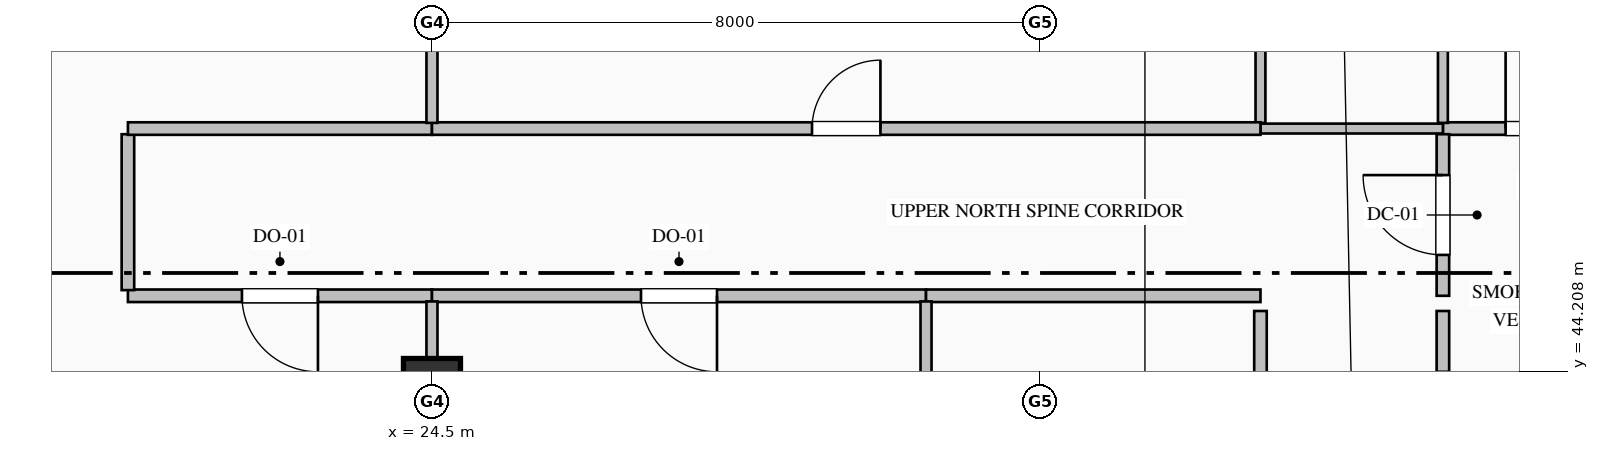
"""IFC4 building model, lengths in metres.
Left out: names, types, materials, properties, quantities, classifications, styles, units other than length and angle.
Written with IfcOpenShell. Run it as: python <this file> out.ifc"""

import sys

from ifc_helpers import new_model, si_unit, direction, frame, frame_2d, origin, origin_2d, place, context, subcontext, project, spatial, rectangle, extrude, element, fill, save


model = new_model("IFC4")
c1 = context("Model", 3, precision=1e-05, world=origin(), true_north=direction((0.0, 1.0)))
c2 = subcontext(c1, "Body", "Model", "MODEL_VIEW")
j1 = project(units=[si_unit("LENGTHUNIT", "METRE"), si_unit("PLANEANGLEUNIT", "RADIAN")], contexts=[c1])
p1 = place(None, origin())
s1 = spatial("IfcSite", under=j1, at=p1, CompositionType="ELEMENT")
p2 = place(p1, origin())
s2 = spatial("IfcBuilding", under=s1, at=p2, CompositionType="ELEMENT")
p3 = place(p2, frame((0.0, 0.0, 323.2)))
s3 = spatial("IfcBuildingStorey", under=s2, at=p3, CompositionType="ELEMENT", Elevation=323.2)
p4 = place(p3, frame((24.5, 44.0, 0.0), z_axis=(0.0, 0.0, 1.0), x_axis=(1.0, 0.0, 0.0)))
e1 = element("IfcColumn", 1, at=p4, inside=s3, PredefinedType="COLUMN", context=c2, shape_type="SweptSolid", body=[
    extrude(rectangle(XDim=0.75, YDim=0.75, at=origin_2d()), origin(), (0.0, 0.0, 1.0), 4.0),
])
p5 = place(p3, frame((16.627, 47.873, 0.0), z_axis=(0.0, 0.0, 1.0), x_axis=(0.707106781187, 0.707106781187, 0.0)))
e2 = element("IfcWall", 2, at=p5, inside=s3, PredefinedType="SOLIDWALL", context=c2, shape_type="SweptSolid", body=[
    extrude(rectangle(XDim=5.657, YDim=0.36, at=frame_2d((2.828, 0.0))), origin(), (0.0, 0.0, 1.0), 3.785),
])
p6 = place(p3, frame((37.8, 47.4, 0.0), z_axis=(0.0, 0.0, 1.0), x_axis=(1.0, 0.0, 0.0)))
e3 = element("IfcWall", 3, at=p6, inside=s3, PredefinedType="PARTITIONING", context=c2, shape_type="SweptSolid", body=[
    extrude(rectangle(XDim=2.7, YDim=0.165, at=frame_2d((1.35, 0.0))), origin(), (0.0, 0.0, 1.0), 3.785),
])
p7 = place(p6, frame((0.825, 0.0, 0.0)))
e4 = element("IfcOpeningElement", 4, at=p7, cuts=e3, PredefinedType="OPENING", context=c2, shape_type="SweptSolid", body=[
    extrude(rectangle(XDim=1.05, YDim=2.15, at=frame_2d((0.525, 1.075))), frame((0.0, 0.093, 0.0), z_axis=(0.0, -1.0, 0.0), x_axis=(1.0, 0.0, 0.0)), (0.0, 0.0, 1.0), 0.185),
])
p8 = place(p3, frame((37.8, 45.2, 0.0), z_axis=(0.0, 0.0, 1.0), x_axis=(0.0, 1.0, 0.0)))
e5 = element("IfcWall", 5, at=p8, inside=s3, PredefinedType="PARTITIONING", context=c2, shape_type="SweptSolid", body=[
    extrude(rectangle(XDim=2.125, YDim=0.165, at=frame_2d((1.063, 0.0))), origin(), (0.0, 0.0, 1.0), 3.785),
])
p9 = place(p8, frame((0.538, 0.0, 0.0)))
e6 = element("IfcOpeningElement", 6, at=p9, cuts=e5, PredefinedType="OPENING", context=c2, shape_type="SweptSolid", body=[
    extrude(rectangle(XDim=1.05, YDim=2.15, at=frame_2d((0.525, 1.075))), frame((0.0, 0.093, 0.0), z_axis=(0.0, -1.0, 0.0), x_axis=(1.0, 0.0, 0.0)), (0.0, 0.0, 1.0), 0.185),
])
p10 = place(p3, frame((37.8, 44.2, 0.0), z_axis=(0.0, 0.0, 1.0), x_axis=(0.0, 1.0, 0.0)))
e7 = element("IfcWall", 7, at=p10, inside=s3, PredefinedType="PARTITIONING", context=c2, shape_type="SweptSolid", body=[
    extrude(rectangle(XDim=0.8, YDim=0.165, at=frame_2d((0.4, 0.0))), origin(), (0.0, 0.0, 1.0), 3.785),
])
p11 = place(p3, frame((37.8, 47.475, 0.0), z_axis=(0.0, 0.0, 1.0), x_axis=(0.0, 1.0, 0.0)))
e8 = element("IfcWall", 8, at=p11, inside=s3, PredefinedType="PARTITIONING", context=c2, shape_type="SweptSolid", body=[
    extrude(rectangle(XDim=4.173, YDim=0.13, at=frame_2d((2.087, 0.0))), origin(), (0.0, 0.0, 1.0), 3.785),
])
p12 = place(p11, frame((1.577, 0.0, 0.0)))
e9 = element("IfcOpeningElement", 9, at=p12, cuts=e8, PredefinedType="OPENING", context=c2, shape_type="SweptSolid", body=[
    extrude(rectangle(XDim=1.02, YDim=2.15, at=frame_2d((0.51, 1.075))), frame((0.0, 0.075, 0.0), z_axis=(0.0, -1.0, 0.0), x_axis=(1.0, 0.0, 0.0)), (0.0, 0.0, 1.0), 0.15),
])
p13 = place(p3, frame((37.8, 47.4, 0.0), z_axis=(0.0, 0.0, 1.0), x_axis=(-1.0, 0.0, 0.0)))
e10 = element("IfcWall", 10, at=p13, inside=s3, PredefinedType="PARTITIONING", context=c2, shape_type="SweptSolid", body=[
    extrude(rectangle(XDim=2.4, YDim=0.13, at=frame_2d((1.2, 0.0))), origin(), (0.0, 0.0, 1.0), 3.785),
])
p14 = place(p3, frame((35.4, 47.475, 0.0), z_axis=(0.0, 0.0, 1.0), x_axis=(0.0, 1.0, 0.0)))
e11 = element("IfcWall", 11, at=p14, inside=s3, PredefinedType="PARTITIONING", context=c2, shape_type="SweptSolid", body=[
    extrude(rectangle(XDim=4.173, YDim=0.13, at=frame_2d((2.087, 0.0))), origin(), (0.0, 0.0, 1.0), 3.785),
])
p15 = place(p3, frame((24.5, 45.2, 0.0), z_axis=(0.0, 0.0, 1.0), x_axis=(-1.0, 0.0, 0.0)))
e12 = element("IfcWall", 12, at=p15, inside=s3, PredefinedType="PARTITIONING", context=c2, shape_type="SweptSolid", body=[
    extrude(rectangle(XDim=4.0, YDim=0.165, at=frame_2d((2.0, 0.0))), origin(), (0.0, 0.0, 1.0), 3.785),
])
p16 = place(p15, frame((1.5, 0.0, 0.0)))
e13 = element("IfcOpeningElement", 13, at=p16, cuts=e12, PredefinedType="OPENING", context=c2, shape_type="SweptSolid", body=[
    extrude(rectangle(XDim=1.0, YDim=2.15, at=frame_2d((0.5, 1.075))), frame((0.0, 0.093, 0.0), z_axis=(0.0, -1.0, 0.0), x_axis=(1.0, 0.0, 0.0)), (0.0, 0.0, 1.0), 0.185),
])
p17 = place(p3, frame((20.5, 45.274, 0.0), z_axis=(0.0, 0.0, 1.0), x_axis=(0.0, 1.0, 0.0)))
e14 = element("IfcWall", 14, at=p17, inside=s3, PredefinedType="PARTITIONING", context=c2, shape_type="SweptSolid", body=[
    extrude(rectangle(XDim=2.051, YDim=0.165, at=frame_2d((1.025, 0.0))), origin(), (0.0, 0.0, 1.0), 3.785),
])
p18 = place(p3, frame((20.5, 47.4, 0.0), z_axis=(0.0, 0.0, 1.0), x_axis=(1.0, 0.0, 0.0)))
e15 = element("IfcWall", 15, at=p18, inside=s3, PredefinedType="PARTITIONING", context=c2, shape_type="SweptSolid", body=[
    extrude(rectangle(XDim=4.0, YDim=0.165, at=frame_2d((2.0, 0.0))), origin(), (0.0, 0.0, 1.0), 3.785),
])
p19 = place(p3, frame((24.5, 47.4, 0.0), z_axis=(0.0, 0.0, 1.0), x_axis=(1.0, 0.0, 0.0)))
e16 = element("IfcWall", 16, at=p19, inside=s3, PredefinedType="PARTITIONING", context=c2, shape_type="SweptSolid", body=[
    extrude(rectangle(XDim=10.9, YDim=0.165, at=frame_2d((5.45, 0.0))), origin(), (0.0, 0.0, 1.0), 3.785),
])
p20 = place(p19, frame((5.0, 0.0, 0.0)))
e17 = element("IfcOpeningElement", 17, at=p20, cuts=e16, PredefinedType="OPENING", context=c2, shape_type="SweptSolid", body=[
    extrude(rectangle(XDim=0.9, YDim=2.15, at=frame_2d((0.45, 1.075))), frame((0.0, 0.093, 0.0), z_axis=(0.0, -1.0, 0.0), x_axis=(1.0, 0.0, 0.0)), (0.0, 0.0, 1.0), 0.185),
])
p21 = place(p3, frame((31.0, 45.2, 0.0), z_axis=(0.0, 0.0, 1.0), x_axis=(-1.0, 0.0, 0.0)))
e18 = element("IfcWall", 18, at=p21, inside=s3, PredefinedType="PARTITIONING", context=c2, shape_type="SweptSolid", body=[
    extrude(rectangle(XDim=6.5, YDim=0.165, at=frame_2d((3.25, 0.0))), origin(), (0.0, 0.0, 1.0), 3.785),
])
p22 = place(p21, frame((2.75, 0.0, 0.0)))
e19 = element("IfcOpeningElement", 19, at=p22, cuts=e18, PredefinedType="OPENING", context=c2, shape_type="SweptSolid", body=[
    extrude(rectangle(XDim=1.0, YDim=2.15, at=frame_2d((0.5, 1.075))), frame((0.0, 0.093, 0.0), z_axis=(0.0, -1.0, 0.0), x_axis=(1.0, 0.0, 0.0)), (0.0, 0.0, 1.0), 0.185),
])
p23 = place(p3, frame((35.4, 45.2, 0.0), z_axis=(0.0, 0.0, 1.0), x_axis=(-1.0, 0.0, 0.0)))
e20 = element("IfcWall", 20, at=p23, inside=s3, PredefinedType="PARTITIONING", context=c2, shape_type="SweptSolid", body=[
    extrude(rectangle(XDim=4.4, YDim=0.165, at=frame_2d((2.2, 0.0))), origin(), (0.0, 0.0, 1.0), 3.785),
])
p24 = place(p3, frame((35.4, 33.6, 0.0), z_axis=(0.0, 0.0, 1.0), x_axis=(0.0, 1.0, 0.0)))
e21 = element("IfcWall", 21, at=p24, inside=s3, PredefinedType="PARTITIONING", context=c2, shape_type="SweptSolid", body=[
    extrude(rectangle(XDim=11.4, YDim=0.165, at=frame_2d((5.7, 0.0))), origin(), (0.0, 0.0, 1.0), 3.785),
])
p25 = place(p24, frame((5.2, 0.0, 0.0)))
e22 = element("IfcOpeningElement", 22, at=p25, cuts=e21, PredefinedType="OPENING", context=c2, shape_type="SweptSolid", body=[
    extrude(rectangle(XDim=1.0, YDim=2.15, at=frame_2d((0.5, 1.075))), frame((0.0, 0.093, 0.0), z_axis=(0.0, -1.0, 0.0), x_axis=(1.0, 0.0, 0.0)), (0.0, 0.0, 1.0), 0.185),
])
p26 = place(p3, frame((24.5, 51.648, 0.0), z_axis=(0.0, 0.0, 1.0), x_axis=(0.0, -1.0, 0.0)))
e23 = element("IfcWall", 23, at=p26, inside=s3, PredefinedType="PARTITIONING", context=c2, shape_type="SweptSolid", body=[
    extrude(rectangle(XDim=4.173, YDim=0.145, at=frame_2d((2.087, 0.0))), origin(), (0.0, 0.0, 1.0), 3.177),
])
p27 = place(p3, frame((24.5, 45.125, 0.0), z_axis=(0.0, 0.0, 1.0), x_axis=(0.0, -1.0, 0.0)))
e24 = element("IfcWall", 24, at=p27, inside=s3, PredefinedType="PARTITIONING", context=c2, shape_type="SweptSolid", body=[
    extrude(rectangle(XDim=16.773, YDim=0.145, at=frame_2d((8.387, 0.0))), origin(), (0.0, 0.0, 1.0), 3.177),
])
p28 = place(p3, frame((31.0, 45.125, 0.0), z_axis=(0.0, 0.0, 1.0), x_axis=(0.0, -1.0, 0.0)))
e25 = element("IfcWall", 25, at=p28, inside=s3, PredefinedType="PARTITIONING", context=c2, shape_type="SweptSolid", body=[
    extrude(rectangle(XDim=16.773, YDim=0.145, at=frame_2d((8.387, 0.0))), origin(), (0.0, 0.0, 1.0), 3.785),
])
p29 = place(p7, origin())
e26 = element("IfcDoor", 26, at=p29, inside=s3, OperationType="SINGLE_SWING_LEFT", PredefinedType="DOOR", context=c2, shape_type="SweptSolid", body=[
    extrude(rectangle(XDim=1.05, YDim=2.15, at=frame_2d((0.525, 1.075))), frame((0.0, 0.025, 0.0), z_axis=(0.0, -1.0, 0.0), x_axis=(1.0, 0.0, 0.0)), (0.0, 0.0, 1.0), 0.05),
])
fill(e4, e26)
p30 = place(p9, origin())
e27 = element("IfcDoor", 27, at=p30, inside=s3, OperationType="SINGLE_SWING_RIGHT", PredefinedType="DOOR", context=c2, shape_type="SweptSolid", body=[
    extrude(rectangle(XDim=1.05, YDim=2.15, at=frame_2d((0.525, 1.075))), frame((0.0, 0.025, 0.0), z_axis=(0.0, -1.0, 0.0), x_axis=(1.0, 0.0, 0.0)), (0.0, 0.0, 1.0), 0.05),
])
fill(e6, e27)
p31 = place(p16, origin())
e28 = element("IfcDoor", 28, at=p31, inside=s3, OperationType="SINGLE_SWING_LEFT", PredefinedType="DOOR", context=c2, shape_type="SweptSolid", body=[
    extrude(rectangle(XDim=1.0, YDim=2.15, at=frame_2d((0.5, 1.075))), frame((0.0, 0.025, 0.0), z_axis=(0.0, -1.0, 0.0), x_axis=(1.0, 0.0, 0.0)), (0.0, 0.0, 1.0), 0.05),
])
fill(e13, e28)
p32 = place(p20, origin())
e29 = element("IfcDoor", 29, at=p32, inside=s3, OperationType="SINGLE_SWING_RIGHT", PredefinedType="DOOR", context=c2, shape_type="SweptSolid", body=[
    extrude(rectangle(XDim=0.9, YDim=2.15, at=frame_2d((0.45, 1.075))), frame((0.0, 0.025, 0.0), z_axis=(0.0, -1.0, 0.0), x_axis=(1.0, 0.0, 0.0)), (0.0, 0.0, 1.0), 0.05),
])
fill(e17, e29)
p33 = place(p22, origin())
e30 = element("IfcDoor", 30, at=p33, inside=s3, OperationType="SINGLE_SWING_LEFT", PredefinedType="DOOR", context=c2, shape_type="SweptSolid", body=[
    extrude(rectangle(XDim=1.0, YDim=2.15, at=frame_2d((0.5, 1.075))), frame((0.0, 0.025, 0.0), z_axis=(0.0, -1.0, 0.0), x_axis=(1.0, 0.0, 0.0)), (0.0, 0.0, 1.0), 0.05),
])
fill(e19, e30)
save(model, sys.argv[1])
